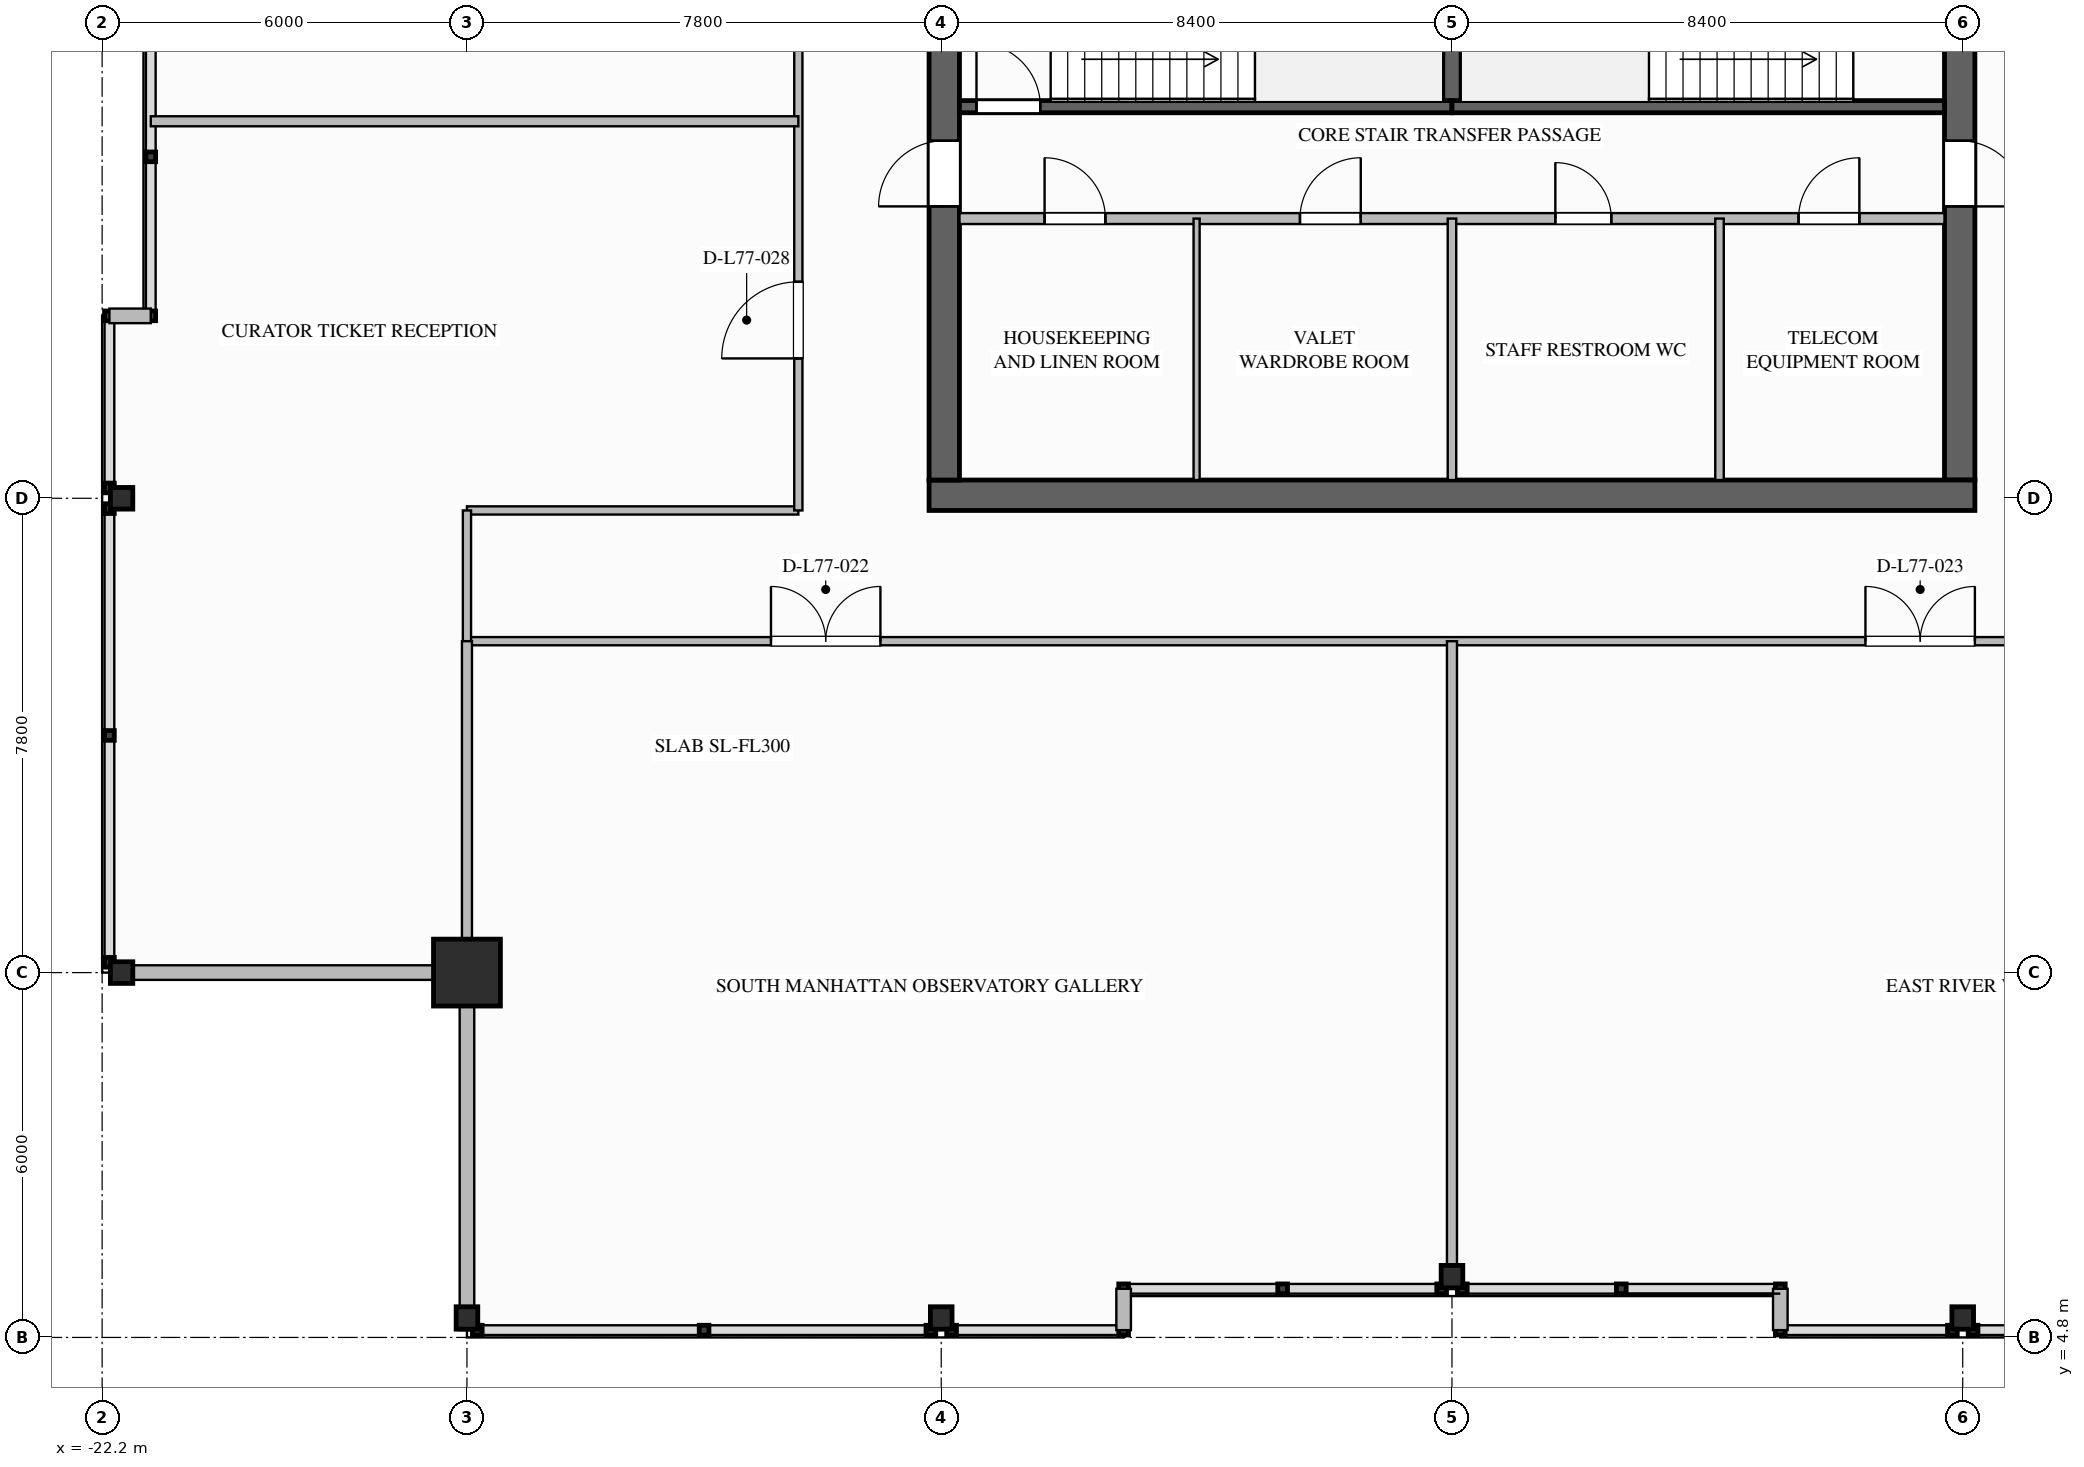
"""IFC4 building model, lengths in metres.
Left out: names, types, materials, properties, quantities, classifications, styles, units other than length and angle.
Written with IfcOpenShell. Run it as: python <this file> out.ifc"""

import sys

from ifc_helpers import new_model, si_unit, direction, frame, frame_2d, origin, origin_2d, place, context, subcontext, project, spatial, rectangle, i_section, extrude, element, fill, save


model = new_model("IFC4")
c1 = context("Model", 3, precision=1e-05, world=origin(), true_north=direction((0.0, 1.0)))
c2 = subcontext(c1, "Body", "Model", "MODEL_VIEW")
j1 = project(units=[si_unit("LENGTHUNIT", "METRE"), si_unit("PLANEANGLEUNIT", "RADIAN")], contexts=[c1])
p1 = place(None, origin())
s1 = spatial("IfcSite", under=j1, at=p1, CompositionType="ELEMENT")
p2 = place(p1, origin())
s2 = spatial("IfcBuilding", under=s1, at=p2, CompositionType="ELEMENT")
p3 = place(p2, frame((0.0, 0.0, 294.2)))
s3 = spatial("IfcBuildingStorey", under=s2, at=p3, CompositionType="ELEMENT", Elevation=294.2)
p4 = place(p3, frame((8.35, 35.1, 0.0), z_axis=(0.0, 0.0, 1.0), x_axis=(0.0, -1.0, 0.0)))
e1 = element("IfcWall", 1, at=p4, inside=s3, PredefinedType="SHEAR", context=c2, shape_type="SweptSolid", body=[
    extrude(rectangle(XDim=16.2, YDim=0.5, at=frame_2d((8.1, 0.0))), origin(), (0.0, 0.0, 1.0), 4.4),
])
p5 = place(p4, frame((3.08, 0.0, 0.0)))
e2 = element("IfcOpeningElement", 2, at=p5, cuts=e1, PredefinedType="OPENING", context=c2, shape_type="SweptSolid", body=[
    extrude(rectangle(XDim=1.12, YDim=2.1, at=frame_2d((0.56, 1.05))), frame((0.0, 0.26, 0.0), z_axis=(0.0, -1.0, 0.0), x_axis=(1.0, 0.0, 0.0)), (0.0, 0.0, 1.0), 0.52),
])
p6 = place(p4, frame((10.62, 0.0, 0.0)))
e3 = element("IfcOpeningElement", 3, at=p6, cuts=e1, PredefinedType="OPENING", context=c2, shape_type="SweptSolid", body=[
    extrude(rectangle(XDim=1.08, YDim=2.04, at=frame_2d((0.54, 1.02))), frame((0.0, 0.26, 0.0), z_axis=(0.0, -1.0, 0.0), x_axis=(1.0, 0.0, 0.0)), (0.0, 0.0, 1.0), 0.52),
])
p7 = place(p3, frame((8.6, 18.65, 0.0), z_axis=(0.0, 0.0, 1.0), x_axis=(-1.0, 0.0, 0.0)))
e4 = element("IfcWall", 4, at=p7, inside=s3, PredefinedType="SHEAR", context=c2, shape_type="SweptSolid", body=[
    extrude(rectangle(XDim=17.2, YDim=0.5, at=frame_2d((8.6, 0.0))), origin(), (0.0, 0.0, 1.0), 4.4),
])
p8 = place(p3, frame((-8.35, 18.9, 0.0), z_axis=(0.0, 0.0, 1.0), x_axis=(0.0, 1.0, 0.0)))
e5 = element("IfcWall", 5, at=p8, inside=s3, PredefinedType="SHEAR", context=c2, shape_type="SweptSolid", body=[
    extrude(rectangle(XDim=16.2, YDim=0.5, at=frame_2d((8.1, 0.0))), origin(), (0.0, 0.0, 1.0), 4.4),
])
p9 = place(p8, frame((12.02, 0.0, 0.0)))
e6 = element("IfcOpeningElement", 6, at=p9, cuts=e5, PredefinedType="OPENING", context=c2, shape_type="SweptSolid", body=[
    extrude(rectangle(XDim=1.08, YDim=2.04, at=frame_2d((0.54, 1.02))), frame((0.0, 0.26, 0.0), z_axis=(0.0, -1.0, 0.0), x_axis=(1.0, 0.0, 0.0)), (0.0, 0.0, 1.0), 0.52),
])
p10 = place(p8, frame((4.5, 0.0, 0.0)))
e7 = element("IfcOpeningElement", 7, at=p10, cuts=e5, PredefinedType="OPENING", context=c2, shape_type="SweptSolid", body=[
    extrude(rectangle(XDim=1.08, YDim=2.04, at=frame_2d((0.54, 1.02))), frame((0.0, 0.26, 0.0), z_axis=(0.0, -1.0, 0.0), x_axis=(1.0, 0.0, 0.0)), (0.0, 0.0, 1.0), 0.52),
])
p11 = place(p3, frame((-16.2, 10.8, 0.0), z_axis=(0.0, 0.0, 1.0), x_axis=(1.0, 0.0, 0.0)))
e8 = element("IfcColumn", 8, at=p11, inside=s3, PredefinedType="COLUMN", context=c2, shape_type="SweptSolid", body=[
    extrude(rectangle(XDim=1.1, YDim=1.1, at=origin_2d()), origin(), (0.0, 0.0, 1.0), 4.4),
])
for number, where, z_axis, x_axis in (
    (9, (-21.88, 10.8, 0.0), (0.0, 0.0, 1.0), (1.0, 0.0, 0.0)),
    (10, (-21.88, 18.6, 0.0), (0.0, 0.0, 1.0), (1.0, 0.0, 0.0)),
    (11, (-16.2, 5.12, 0.0), (0.0, 0.0, 1.0), (0.0, 1.0, 0.0)),
    (12, (-8.4, 5.12, 0.0), (0.0, 0.0, 1.0), (0.0, 1.0, 0.0)),
    (13, (0.0, 5.8, 0.0), (0.0, 0.0, 1.0), (0.0, 1.0, 0.0)),
    (14, (8.4, 5.12, 0.0), (0.0, 0.0, 1.0), (0.0, 1.0, 0.0)),
):
    element("IfcColumn", number, at=place(p3, frame(where, z_axis=z_axis, x_axis=x_axis)), inside=s3, PredefinedType="COLUMN", context=c2, shape_type="SweptSolid", body=[
        extrude(i_section(OverallWidth=0.369, OverallDepth=0.356, WebThickness=0.011, FlangeThickness=0.018, FilletRadius=0.025, at=origin_2d()), origin(), (0.0, 0.0, 1.0), 4.397),
    ])
for number, where, z_axis, x_axis in (
    (15, (-16.2, 4.92, 0.0), (0.0, 0.0, 1.0), (0.0, 1.0, 0.0)),
    (16, (-16.2, 10.8, 0.0), (0.0, 0.0, 1.0), (-1.0, 0.0, 0.0)),
):
    element("IfcWall", number, at=place(p3, frame(where, z_axis=z_axis, x_axis=x_axis)), inside=s3, PredefinedType="STANDARD", context=c2, shape_type="SweptSolid", body=[
        extrude(rectangle(XDim=5.88, YDim=0.24, at=frame_2d((2.94, 0.0))), origin(), (0.0, 0.0, 1.0), 3.489),
    ])
for number, where, z_axis, x_axis in (
    (17, (-22.08, 21.6, 0.0), (0.0, 0.0, 1.0), (1.0, 0.0, 0.0)),
    (18, (5.4, 4.92, 0.0), (0.0, 0.0, 1.0), (0.0, 1.0, 0.0)),
    (19, (-5.4, 5.6, 0.0), (0.0, 0.0, 1.0), (0.0, -1.0, 0.0)),
):
    element("IfcWall", number, at=place(p3, frame(where, z_axis=z_axis, x_axis=x_axis)), inside=s3, PredefinedType="STANDARD", context=c2, shape_type="SweptSolid", body=[
        extrude(rectangle(XDim=0.68, YDim=0.24, at=frame_2d((0.34, 0.0))), origin(), (0.0, 0.0, 1.0), 4.1),
    ])
p12 = place(p3, frame((0.0, 25.04, 0.0), z_axis=(0.0, 0.0, 1.0), x_axis=(0.0, 1.0, 0.0)))
e20 = element("IfcWall", 20, at=p12, inside=s3, PredefinedType="SOLIDWALL", context=c2, shape_type="SweptSolid", body=[
    extrude(rectangle(XDim=3.12, YDim=0.3, at=frame_2d((1.56, 0.0))), origin(), (0.0, 0.0, 1.0), 4.1),
])
p13 = place(p3, frame((-8.1, 25.04, 0.0), z_axis=(0.0, 0.0, 1.0), x_axis=(1.0, 0.0, 0.0)))
e21 = element("IfcWall", 21, at=p13, inside=s3, PredefinedType="SOLIDWALL", context=c2, shape_type="SweptSolid", body=[
    extrude(rectangle(XDim=8.1, YDim=0.2, at=frame_2d((4.05, 0.0))), origin(), (0.0, 0.0, 1.0), 4.1),
])
p14 = place(p13, frame((0.28, 0.0, 0.0)))
e22 = element("IfcOpeningElement", 22, at=p14, cuts=e21, PredefinedType="OPENING", context=c2, shape_type="SweptSolid", body=[
    extrude(rectangle(XDim=1.05, YDim=2.1, at=frame_2d((0.525, 1.05))), frame((0.0, 0.11, 0.0), z_axis=(0.0, -1.0, 0.0), x_axis=(1.0, 0.0, 0.0)), (0.0, 0.0, 1.0), 0.22),
])
p15 = place(p3, frame((0.0, 25.04, 0.0), z_axis=(0.0, 0.0, 1.0), x_axis=(1.0, 0.0, 0.0)))
e23 = element("IfcWall", 23, at=p15, inside=s3, PredefinedType="SOLIDWALL", context=c2, shape_type="SweptSolid", body=[
    extrude(rectangle(XDim=8.1, YDim=0.2, at=frame_2d((4.05, 0.0))), origin(), (0.0, 0.0, 1.0), 4.1),
])
p16 = place(p3, frame((-8.1, 23.2, 0.0), z_axis=(0.0, 0.0, 1.0), x_axis=(1.0, 0.0, 0.0)))
e24 = element("IfcWall", 24, at=p16, inside=s3, PredefinedType="SOLIDWALL", context=c2, shape_type="SweptSolid", body=[
    extrude(rectangle(XDim=16.2, YDim=0.18, at=frame_2d((8.1, 0.0))), origin(), (0.0, 0.0, 1.0), 4.1),
])
p17 = place(p16, frame((1.4, 0.0, 0.0)))
e25 = element("IfcOpeningElement", 25, at=p17, cuts=e24, PredefinedType="OPENING", context=c2, shape_type="SweptSolid", body=[
    extrude(rectangle(XDim=1.0, YDim=2.1, at=frame_2d((0.5, 1.05))), frame((0.0, 0.1, 0.0), z_axis=(0.0, -1.0, 0.0), x_axis=(1.0, 0.0, 0.0)), (0.0, 0.0, 1.0), 0.2),
])
p18 = place(p16, frame((5.6, 0.0, 0.0)))
e26 = element("IfcOpeningElement", 26, at=p18, cuts=e24, PredefinedType="OPENING", context=c2, shape_type="SweptSolid", body=[
    extrude(rectangle(XDim=1.0, YDim=2.1, at=frame_2d((0.5, 1.05))), frame((0.0, 0.1, 0.0), z_axis=(0.0, -1.0, 0.0), x_axis=(1.0, 0.0, 0.0)), (0.0, 0.0, 1.0), 0.2),
])
p19 = place(p16, frame((9.8, 0.0, 0.0)))
e27 = element("IfcOpeningElement", 27, at=p19, cuts=e24, PredefinedType="OPENING", context=c2, shape_type="SweptSolid", body=[
    extrude(rectangle(XDim=0.92, YDim=2.1, at=frame_2d((0.46, 1.05))), frame((0.0, 0.1, 0.0), z_axis=(0.0, -1.0, 0.0), x_axis=(1.0, 0.0, 0.0)), (0.0, 0.0, 1.0), 0.2),
])
p20 = place(p16, frame((13.8, 0.0, 0.0)))
e28 = element("IfcOpeningElement", 28, at=p20, cuts=e24, PredefinedType="OPENING", context=c2, shape_type="SweptSolid", body=[
    extrude(rectangle(XDim=1.0, YDim=2.1, at=frame_2d((0.5, 1.05))), frame((0.0, 0.1, 0.0), z_axis=(0.0, -1.0, 0.0), x_axis=(1.0, 0.0, 0.0)), (0.0, 0.0, 1.0), 0.2),
])
p21 = place(p3, frame((-4.2, 18.9, 0.0), z_axis=(0.0, 0.0, 1.0), x_axis=(0.0, 1.0, 0.0)))
e29 = element("IfcWall", 29, at=p21, inside=s3, PredefinedType="PARTITIONING", context=c2, shape_type="SweptSolid", body=[
    extrude(rectangle(XDim=4.3, YDim=0.1, at=frame_2d((2.15, 0.0))), origin(), (0.0, 0.0, 1.0), 4.1),
])
for number, where, z_axis, x_axis in (
    (30, (0.0, 18.9, 0.0), (0.0, 0.0, 1.0), (0.0, 1.0, 0.0)),
    (31, (4.4, 18.9, 0.0), (0.0, 0.0, 1.0), (0.0, 1.0, 0.0)),
):
    element("IfcWall", number, at=place(p3, frame(where, z_axis=z_axis, x_axis=x_axis)), inside=s3, PredefinedType="PLUMBINGWALL", context=c2, shape_type="SweptSolid", body=[
        extrude(rectangle(XDim=4.3, YDim=0.14, at=frame_2d((2.15, 0.0))), origin(), (0.0, 0.0, 1.0), 4.1),
    ])
p22 = place(p3, frame((-16.2, 16.25, 0.0), z_axis=(0.0, 0.0, 1.0), x_axis=(1.0, 0.0, 0.0)))
e32 = element("IfcWall", 32, at=p22, inside=s3, PredefinedType="PARTITIONING", context=c2, shape_type="SweptSolid", body=[
    extrude(rectangle(XDim=32.4, YDim=0.135, at=frame_2d((16.2, 0.0))), origin(), (0.0, 0.0, 1.0), 4.1),
])
p23 = place(p22, frame((5.0, 0.0, 0.0)))
e33 = element("IfcOpeningElement", 33, at=p23, cuts=e32, PredefinedType="OPENING", context=c2, shape_type="SweptSolid", body=[
    extrude(rectangle(XDim=1.8, YDim=2.35, at=frame_2d((0.9, 1.175))), frame((0.0, 0.077, 0.0), z_axis=(0.0, -1.0, 0.0), x_axis=(1.0, 0.0, 0.0)), (0.0, 0.0, 1.0), 0.155),
])
p24 = place(p22, frame((23.0, 0.0, 0.0)))
e34 = element("IfcOpeningElement", 34, at=p24, cuts=e32, PredefinedType="OPENING", context=c2, shape_type="SweptSolid", body=[
    extrude(rectangle(XDim=1.8, YDim=2.35, at=frame_2d((0.9, 1.175))), frame((0.0, 0.077, 0.0), z_axis=(0.0, -1.0, 0.0), x_axis=(1.0, 0.0, 0.0)), (0.0, 0.0, 1.0), 0.155),
])
p25 = place(p3, frame((-16.2, 18.4, 0.0), z_axis=(0.0, 0.0, 1.0), x_axis=(1.0, 0.0, 0.0)))
e35 = element("IfcWall", 35, at=p25, inside=s3, PredefinedType="PARTITIONING", context=c2, shape_type="SweptSolid", body=[
    extrude(rectangle(XDim=5.45, YDim=0.135, at=frame_2d((2.725, 0.0))), origin(), (0.0, 0.0, 1.0), 3.478),
])
p26 = place(p3, frame((-10.75, 18.4, 0.0), z_axis=(0.0, 0.0, 1.0), x_axis=(0.0, 1.0, 0.0)))
e36 = element("IfcWall", 36, at=p26, inside=s3, PredefinedType="PARTITIONING", context=c2, shape_type="SweptSolid", body=[
    extrude(rectangle(XDim=17.2, YDim=0.135, at=frame_2d((8.6, 0.0))), origin(), (0.0, 0.0, 1.0), 4.1),
])
p27 = place(p26, frame((2.5, 0.0, 0.0)))
e37 = element("IfcOpeningElement", 37, at=p27, cuts=e36, PredefinedType="OPENING", context=c2, shape_type="SweptSolid", body=[
    extrude(rectangle(XDim=1.26, YDim=2.2, at=frame_2d((0.63, 1.1))), frame((0.0, 0.077, 0.0), z_axis=(0.0, -1.0, 0.0), x_axis=(1.0, 0.0, 0.0)), (0.0, 0.0, 1.0), 0.155),
])
p28 = place(p26, frame((12.0, 0.0, 0.0)))
e38 = element("IfcOpeningElement", 38, at=p28, cuts=e36, PredefinedType="OPENING", context=c2, shape_type="SweptSolid", body=[
    extrude(rectangle(XDim=1.26, YDim=2.2, at=frame_2d((0.63, 1.1))), frame((0.0, 0.077, 0.0), z_axis=(0.0, -1.0, 0.0), x_axis=(1.0, 0.0, 0.0)), (0.0, 0.0, 1.0), 0.155),
])
p29 = place(p3, frame((-16.2, 16.25, 0.0), z_axis=(0.0, 0.0, 1.0), x_axis=(0.0, 1.0, 0.0)))
e39 = element("IfcWall", 39, at=p29, inside=s3, PredefinedType="PARTITIONING", context=c2, shape_type="SweptSolid", body=[
    extrude(rectangle(XDim=2.15, YDim=0.135, at=frame_2d((1.075, 0.0))), origin(), (0.0, 0.0, 1.0), 3.474),
])
p30 = place(p3, frame((-16.2, 10.92, 0.0), z_axis=(0.0, 0.0, 1.0), x_axis=(0.0, 1.0, 0.0)))
e40 = element("IfcWall", 40, at=p30, inside=s3, PredefinedType="PARTITIONING", context=c2, shape_type="SweptSolid", body=[
    extrude(rectangle(XDim=5.33, YDim=0.165, at=frame_2d((2.665, 0.0))), origin(), (0.0, 0.0, 1.0), 3.474),
])
p31 = place(p3, frame((0.0, 5.6, 0.0), z_axis=(0.0, 0.0, 1.0), x_axis=(0.0, 1.0, 0.0)))
e41 = element("IfcWall", 41, at=p31, inside=s3, PredefinedType="PARTITIONING", context=c2, shape_type="SweptSolid", body=[
    extrude(rectangle(XDim=10.65, YDim=0.165, at=frame_2d((5.325, 0.0))), origin(), (0.0, 0.0, 1.0), 3.474),
])
p32 = place(p3, frame((-21.4, 24.8, 0.0), z_axis=(0.0, 0.0, 1.0), x_axis=(1.0, 0.0, 0.0)))
e42 = element("IfcWall", 42, at=p32, inside=s3, PredefinedType="PARTITIONING", context=c2, shape_type="SweptSolid", body=[
    extrude(rectangle(XDim=10.65, YDim=0.165, at=frame_2d((5.325, 0.0))), origin(), (0.0, 0.0, 1.0), 4.1),
])
p33 = place(p14, origin())
e43 = element("IfcDoor", 43, at=p33, inside=s3, OperationType="SINGLE_SWING_LEFT", PredefinedType="DOOR", context=c2, shape_type="SweptSolid", body=[
    extrude(rectangle(XDim=1.05, YDim=2.1, at=frame_2d((0.525, 1.05))), frame((0.0, 0.025, 0.0), z_axis=(0.0, -1.0, 0.0), x_axis=(1.0, 0.0, 0.0)), (0.0, 0.0, 1.0), 0.05),
])
fill(e22, e43)
p34 = place(p10, origin())
e44 = element("IfcDoor", 44, at=p34, inside=s3, OperationType="SINGLE_SWING_LEFT", PredefinedType="DOOR", context=c2, shape_type="SweptSolid", body=[
    extrude(rectangle(XDim=1.08, YDim=2.04, at=frame_2d((0.54, 1.02))), frame((0.0, 0.025, 0.0), z_axis=(0.0, -1.0, 0.0), x_axis=(1.0, 0.0, 0.0)), (0.0, 0.0, 1.0), 0.05),
])
fill(e7, e44)
p35 = place(p6, origin())
e45 = element("IfcDoor", 45, at=p35, inside=s3, OperationType="SINGLE_SWING_RIGHT", PredefinedType="DOOR", context=c2, shape_type="SweptSolid", body=[
    extrude(rectangle(XDim=1.08, YDim=2.04, at=frame_2d((0.54, 1.02))), frame((0.0, 0.025, 0.0), z_axis=(0.0, -1.0, 0.0), x_axis=(1.0, 0.0, 0.0)), (0.0, 0.0, 1.0), 0.05),
])
fill(e3, e45)
p36 = place(p17, origin())
e46 = element("IfcDoor", 46, at=p36, inside=s3, OperationType="SINGLE_SWING_LEFT", PredefinedType="DOOR", context=c2, shape_type="SweptSolid", body=[
    extrude(rectangle(XDim=1.0, YDim=2.1, at=frame_2d((0.5, 1.05))), frame((0.0, 0.025, 0.0), z_axis=(0.0, -1.0, 0.0), x_axis=(1.0, 0.0, 0.0)), (0.0, 0.0, 1.0), 0.05),
])
fill(e25, e46)
p37 = place(p18, origin())
e47 = element("IfcDoor", 47, at=p37, inside=s3, OperationType="SINGLE_SWING_RIGHT", PredefinedType="DOOR", context=c2, shape_type="SweptSolid", body=[
    extrude(rectangle(XDim=1.0, YDim=2.1, at=frame_2d((0.5, 1.05))), frame((0.0, 0.025, 0.0), z_axis=(0.0, -1.0, 0.0), x_axis=(1.0, 0.0, 0.0)), (0.0, 0.0, 1.0), 0.05),
])
fill(e26, e47)
p38 = place(p19, origin())
e48 = element("IfcDoor", 48, at=p38, inside=s3, OperationType="SINGLE_SWING_LEFT", PredefinedType="DOOR", context=c2, shape_type="SweptSolid", body=[
    extrude(rectangle(XDim=0.92, YDim=2.1, at=frame_2d((0.46, 1.05))), frame((0.0, 0.025, 0.0), z_axis=(0.0, -1.0, 0.0), x_axis=(1.0, 0.0, 0.0)), (0.0, 0.0, 1.0), 0.05),
])
fill(e27, e48)
p39 = place(p20, origin())
e49 = element("IfcDoor", 49, at=p39, inside=s3, OperationType="SINGLE_SWING_RIGHT", PredefinedType="DOOR", context=c2, shape_type="SweptSolid", body=[
    extrude(rectangle(XDim=1.0, YDim=2.1, at=frame_2d((0.5, 1.05))), frame((0.0, 0.025, 0.0), z_axis=(0.0, -1.0, 0.0), x_axis=(1.0, 0.0, 0.0)), (0.0, 0.0, 1.0), 0.05),
])
fill(e28, e49)
p40 = place(p23, origin())
e50 = element("IfcDoor", 50, at=p40, inside=s3, OperationType="DOUBLE_DOOR_SINGLE_SWING", PredefinedType="DOOR", context=c2, shape_type="SweptSolid", body=[
    extrude(rectangle(XDim=1.8, YDim=2.35, at=frame_2d((0.9, 1.175))), frame((0.0, 0.025, 0.0), z_axis=(0.0, -1.0, 0.0), x_axis=(1.0, 0.0, 0.0)), (0.0, 0.0, 1.0), 0.05),
])
fill(e33, e50)
p41 = place(p24, origin())
e51 = element("IfcDoor", 51, at=p41, inside=s3, OperationType="DOUBLE_DOOR_SINGLE_SWING", PredefinedType="DOOR", context=c2, shape_type="SweptSolid", body=[
    extrude(rectangle(XDim=1.8, YDim=2.35, at=frame_2d((0.9, 1.175))), frame((0.0, 0.025, 0.0), z_axis=(0.0, -1.0, 0.0), x_axis=(1.0, 0.0, 0.0)), (0.0, 0.0, 1.0), 0.05),
])
fill(e34, e51)
p42 = place(p27, origin())
e52 = element("IfcDoor", 52, at=p42, inside=s3, OperationType="SINGLE_SWING_LEFT", PredefinedType="DOOR", context=c2, shape_type="SweptSolid", body=[
    extrude(rectangle(XDim=1.26, YDim=2.2, at=frame_2d((0.63, 1.1))), frame((0.0, 0.025, 0.0), z_axis=(0.0, -1.0, 0.0), x_axis=(1.0, 0.0, 0.0)), (0.0, 0.0, 1.0), 0.05),
])
fill(e37, e52)
save(model, sys.argv[1])
